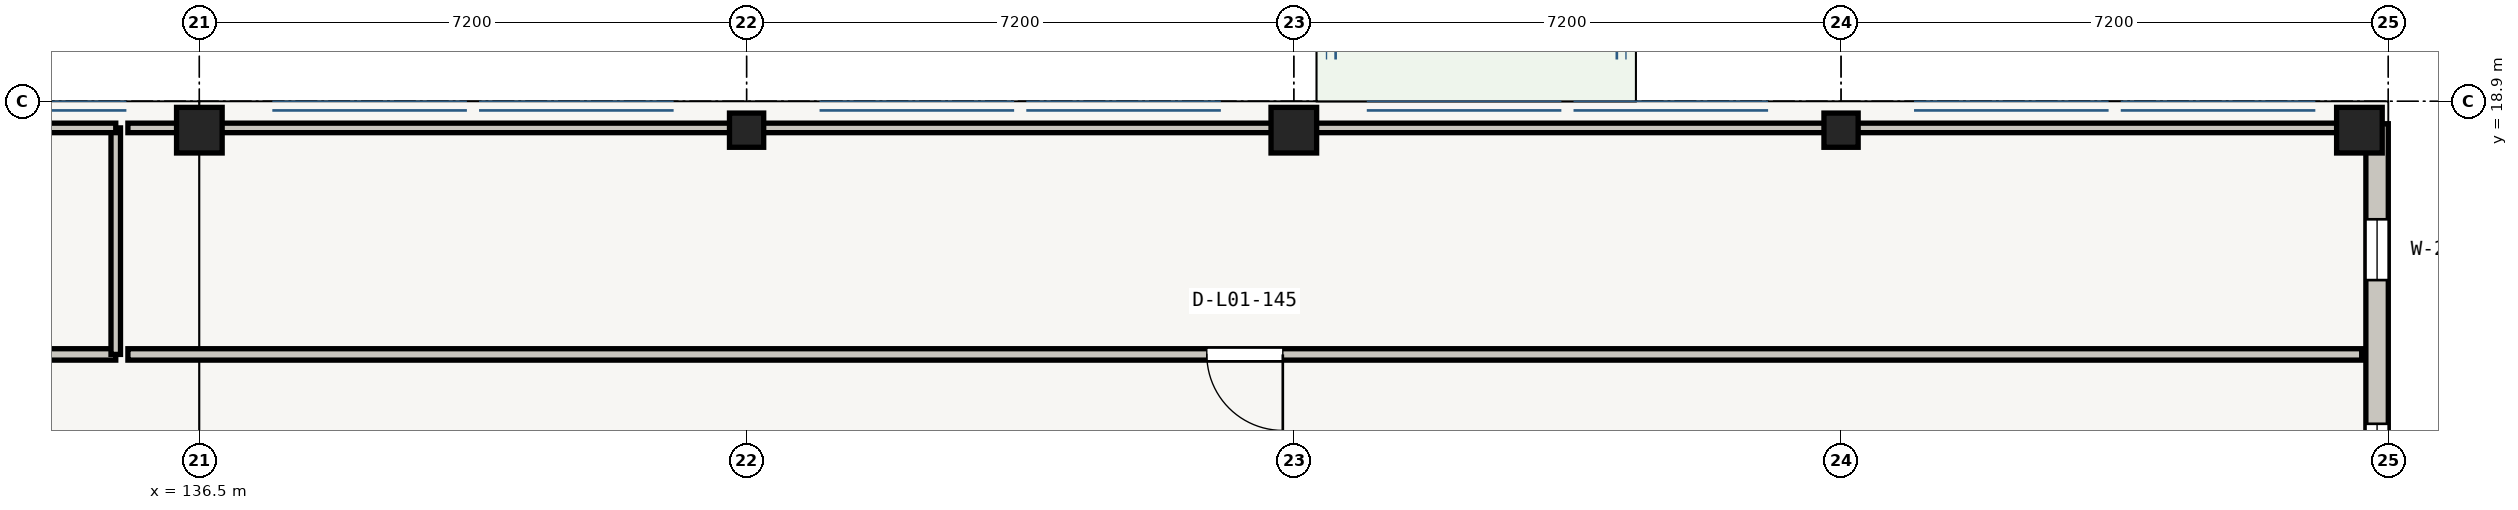
"""IFC4 building model, lengths in metres.
Left out: names, types, materials, properties, quantities, classifications, styles, units other than length and angle.
Written with IfcOpenShell. Run it as: python <this file> out.ifc"""

import sys

from ifc_helpers import new_model, si_unit, direction, frame, frame_2d, origin, origin_2d, place, context, subcontext, project, spatial, rectangle, extrude, element, fill, save


model = new_model("IFC4")
c1 = context("Model", 3, precision=1e-05, world=origin(), true_north=direction((0.0, 1.0)))
c2 = subcontext(c1, "Body", "Model", "MODEL_VIEW")
j1 = project(units=[si_unit("LENGTHUNIT", "METRE"), si_unit("PLANEANGLEUNIT", "RADIAN")], contexts=[c1])
p1 = place(None, origin())
s1 = spatial("IfcSite", under=j1, at=p1, CompositionType="ELEMENT")
p2 = place(p1, origin())
s2 = spatial("IfcBuilding", under=s1, at=p2, CompositionType="ELEMENT")
p3 = place(p2, frame((0.0, 0.0, 4.5)))
s3 = spatial("IfcBuildingStorey", under=s2, at=p3, CompositionType="ELEMENT", Elevation=4.5)
p4 = place(p3, frame((136.5, 18.52, 0.0), z_axis=(0.0, 0.0, 1.0), x_axis=(1.0, 0.0, 0.0)))
e1 = element("IfcColumn", 1, at=p4, inside=s3, PredefinedType="COLUMN", context=c2, shape_type="SweptSolid", body=[
    extrude(rectangle(XDim=0.6, YDim=0.6, at=origin_2d()), origin(), (0.0, 0.0, 1.0), 3.905),
])
p5 = place(p3, frame((143.7, 18.52, 0.0), z_axis=(0.0, 0.0, 1.0), x_axis=(1.0, 0.0, 0.0)))
e2 = element("IfcColumn", 2, at=p5, inside=s3, PredefinedType="COLUMN", context=c2, shape_type="SweptSolid", body=[
    extrude(rectangle(XDim=0.45, YDim=0.45, at=origin_2d()), origin(), (0.0, 0.0, 1.0), 3.905),
])
p6 = place(p3, frame((150.9, 18.52, 0.0), z_axis=(0.0, 0.0, 1.0), x_axis=(1.0, 0.0, 0.0)))
e3 = element("IfcColumn", 3, at=p6, inside=s3, PredefinedType="COLUMN", context=c2, shape_type="SweptSolid", body=[
    extrude(rectangle(XDim=0.6, YDim=0.6, at=origin_2d()), origin(), (0.0, 0.0, 1.0), 3.905),
])
p7 = place(p3, frame((158.1, 18.52, 0.0), z_axis=(0.0, 0.0, 1.0), x_axis=(1.0, 0.0, 0.0)))
e4 = element("IfcColumn", 4, at=p7, inside=s3, PredefinedType="COLUMN", context=c2, shape_type="SweptSolid", body=[
    extrude(rectangle(XDim=0.45, YDim=0.45, at=origin_2d()), origin(), (0.0, 0.0, 1.0), 3.905),
])
p8 = place(p3, frame((164.92, 18.52, 0.0), z_axis=(0.0, 0.0, 1.0), x_axis=(1.0, 0.0, 0.0)))
e5 = element("IfcColumn", 5, at=p8, inside=s3, PredefinedType="COLUMN", context=c2, shape_type="SweptSolid", body=[
    extrude(rectangle(XDim=0.6, YDim=0.6, at=origin_2d()), origin(), (0.0, 0.0, 1.0), 3.905),
])
p9 = place(p3, frame((165.153, 18.605, 0.0), z_axis=(0.0, 0.0, 1.0), x_axis=(0.0, -1.0, 0.0)))
e6 = element("IfcWall", 6, at=p9, inside=s3, PredefinedType="STANDARD", context=c2, shape_type="SweptSolid", body=[
    extrude(rectangle(XDim=6.905, YDim=0.295, at=frame_2d((3.453, 0.0))), origin(), (0.0, 0.0, 1.0), 3.27),
])
p10 = place(p9, frame((1.257, 0.0, 0.55)))
e7 = element("IfcOpeningElement", 7, at=p10, cuts=e6, PredefinedType="OPENING", context=c2, shape_type="SweptSolid", body=[
    extrude(rectangle(XDim=0.8, YDim=2.04, at=frame_2d((0.4, 1.02))), frame((0.0, 0.147, 0.0), z_axis=(0.0, -1.0, 0.0), x_axis=(1.0, 0.0, 0.0)), (0.0, 0.0, 1.0), 0.295),
])
p11 = place(p9, frame((3.948, 0.0, 0.55)))
e8 = element("IfcOpeningElement", 8, at=p11, cuts=e6, PredefinedType="OPENING", context=c2, shape_type="SweptSolid", body=[
    extrude(rectangle(XDim=0.8, YDim=2.04, at=frame_2d((0.4, 1.02))), frame((0.0, 0.147, 0.0), z_axis=(0.0, -1.0, 0.0), x_axis=(1.0, 0.0, 0.0)), (0.0, 0.0, 1.0), 0.295),
])
p12 = place(p3, frame((135.4, 15.57, 0.0), z_axis=(0.0, 0.0, 1.0), x_axis=(-1.0, 0.0, 0.0)))
e9 = element("IfcWall", 9, at=p12, inside=s3, PredefinedType="PARTITIONING", context=c2, shape_type="SweptSolid", body=[
    extrude(rectangle(XDim=29.39, YDim=0.15, at=frame_2d((14.695, 0.0))), origin(), (0.0, 0.0, 1.0), 2.925),
])
p13 = place(p12, frame((14.175, 0.0, 0.0)))
e10 = element("IfcOpeningElement", 10, at=p13, cuts=e9, PredefinedType="OPENING", context=c2, shape_type="SweptSolid", body=[
    extrude(rectangle(XDim=1.04, YDim=2.05, at=frame_2d((0.52, 1.025))), frame((0.0, 0.075, 0.0), z_axis=(0.0, -1.0, 0.0), x_axis=(1.0, 0.0, 0.0)), (0.0, 0.0, 1.0), 0.15),
])
p14 = place(p3, frame((135.4, 18.55, 0.0), z_axis=(0.0, 0.0, 1.0), x_axis=(0.0, -1.0, 0.0)))
e11 = element("IfcWall", 11, at=p14, inside=s3, PredefinedType="PARTITIONING", context=c2, shape_type="SweptSolid", body=[
    extrude(rectangle(XDim=2.98, YDim=0.125, at=frame_2d((1.49, 0.0))), origin(), (0.0, 0.0, 1.0), 2.925),
])
p15 = place(p3, frame((106.01, 18.55, 0.0), z_axis=(0.0, 0.0, 1.0), x_axis=(1.0, 0.0, 0.0)))
e12 = element("IfcWall", 12, at=p15, inside=s3, PredefinedType="PARTITIONING", context=c2, shape_type="SweptSolid", body=[
    extrude(rectangle(XDim=29.39, YDim=0.125, at=frame_2d((14.695, 0.0))), origin(), (0.0, 0.0, 1.0), 2.925),
])
p16 = place(p3, frame((164.95, 15.57, 0.0), z_axis=(0.0, 0.0, 1.0), x_axis=(-1.0, 0.0, 0.0)))
e13 = element("IfcWall", 13, at=p16, inside=s3, PredefinedType="PARTITIONING", context=c2, shape_type="SweptSolid", body=[
    extrude(rectangle(XDim=29.39, YDim=0.15, at=frame_2d((14.695, 0.0))), origin(), (0.0, 0.0, 1.0), 2.925),
])
p17 = place(p16, frame((14.195, 0.0, 0.0)))
e14 = element("IfcOpeningElement", 14, at=p17, cuts=e13, PredefinedType="OPENING", context=c2, shape_type="SweptSolid", body=[
    extrude(rectangle(XDim=1.0, YDim=2.05, at=frame_2d((0.5, 1.025))), frame((0.0, 0.075, 0.0), z_axis=(0.0, -1.0, 0.0), x_axis=(1.0, 0.0, 0.0)), (0.0, 0.0, 1.0), 0.15),
])
p18 = place(p3, frame((135.56, 18.55, 0.0), z_axis=(0.0, 0.0, 1.0), x_axis=(1.0, 0.0, 0.0)))
e15 = element("IfcWall", 15, at=p18, inside=s3, PredefinedType="PARTITIONING", context=c2, shape_type="SweptSolid", body=[
    extrude(rectangle(XDim=29.39, YDim=0.125, at=frame_2d((14.695, 0.0))), origin(), (0.0, 0.0, 1.0), 2.925),
])
p19 = place(p10, origin())
e16 = element("IfcWindow", 16, at=p19, inside=s3, PartitioningType="SINGLE_PANEL", PredefinedType="WINDOW", context=c2, shape_type="SweptSolid", body=[
    extrude(rectangle(XDim=0.8, YDim=2.04, at=frame_2d((0.4, 1.02))), frame((0.0, 0.03, 0.0), z_axis=(0.0, -1.0, 0.0), x_axis=(1.0, 0.0, 0.0)), (0.0, 0.0, 1.0), 0.06),
])
fill(e7, e16)
p20 = place(p11, origin())
e17 = element("IfcWindow", 17, at=p20, inside=s3, PartitioningType="SINGLE_PANEL", PredefinedType="WINDOW", context=c2, shape_type="SweptSolid", body=[
    extrude(rectangle(XDim=0.8, YDim=2.04, at=frame_2d((0.4, 1.02))), frame((0.0, 0.03, 0.0), z_axis=(0.0, -1.0, 0.0), x_axis=(1.0, 0.0, 0.0)), (0.0, 0.0, 1.0), 0.06),
])
fill(e8, e17)
p21 = place(p17, origin())
e18 = element("IfcDoor", 18, at=p21, inside=s3, OperationType="SINGLE_SWING_LEFT", PredefinedType="DOOR", context=c2, shape_type="SweptSolid", body=[
    extrude(rectangle(XDim=1.0, YDim=2.05, at=frame_2d((0.5, 1.025))), frame((0.0, 0.025, 0.0), z_axis=(0.0, -1.0, 0.0), x_axis=(1.0, 0.0, 0.0)), (0.0, 0.0, 1.0), 0.05),
])
fill(e14, e18)
save(model, sys.argv[1])
